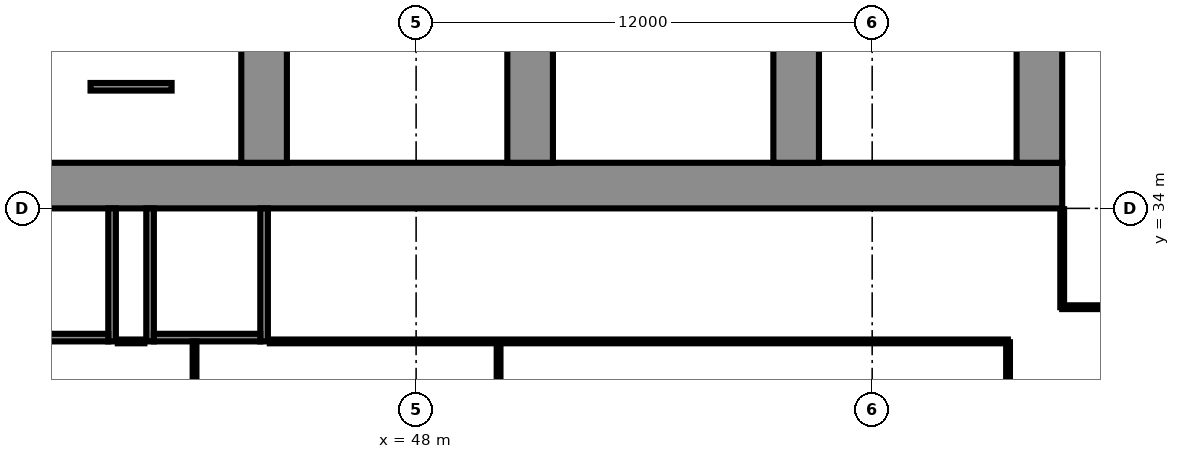
"""IFC4 building model, lengths in metres.
Left out: names, types, materials, properties, quantities, classifications, styles, units other than length and angle.
Written with IfcOpenShell. Run it as: python <this file> out.ifc"""

import sys

from ifc_helpers import new_model, si_unit, direction, frame, frame_2d, origin, place, context, subcontext, project, spatial, polyline, rectangle, outline, extrude, element, fill, save


model = new_model("IFC4")
c1 = context("Model", 3, precision=1e-05, world=origin(), true_north=direction((0.0, 1.0)))
c2 = subcontext(c1, "Body", "Model", "MODEL_VIEW")
j1 = project(units=[si_unit("LENGTHUNIT", "METRE"), si_unit("PLANEANGLEUNIT", "RADIAN")], contexts=[c1])
p1 = place(None, origin())
s1 = spatial("IfcSite", under=j1, at=p1, CompositionType="ELEMENT")
p2 = place(p1, origin())
s2 = spatial("IfcBuilding", under=s1, at=p2, CompositionType="ELEMENT")
p3 = place(p2, frame((0.0, 0.0, 41.5)))
s3 = spatial("IfcBuildingStorey", under=s2, at=p3, CompositionType="ELEMENT", Elevation=41.5)
p4 = place(p3, frame((9.0, 34.6, 0.0), z_axis=(0.0, 0.0, 1.0), x_axis=(1.0, 0.0, 0.0)))
e1 = element("IfcWall", 1, at=p4, inside=s3, PredefinedType="SHEAR", context=c2, shape_type="SweptSolid", body=[
    extrude(rectangle(XDim=56.0, YDim=1.2, at=frame_2d((28.0, 0.0))), origin(), (0.0, 0.0, 1.0), 3.6),
])
p5 = place(p4, frame((3.3, 0.0, 0.0)))
e2 = element("IfcOpeningElement", 2, at=p5, cuts=e1, PredefinedType="OPENING", context=c2, shape_type="SweptSolid", body=[
    extrude(rectangle(XDim=1.0, YDim=2.1, at=frame_2d((0.5, 1.05))), frame((0.0, 0.61, 0.0), z_axis=(0.0, -1.0, 0.0), x_axis=(1.0, 0.0, 0.0)), (0.0, 0.0, 1.0), 1.22),
])
p6 = place(p4, frame((7.867, 0.0, 0.0)))
e3 = element("IfcOpeningElement", 3, at=p6, cuts=e1, PredefinedType="OPENING", context=c2, shape_type="SweptSolid", body=[
    extrude(rectangle(XDim=1.1, YDim=2.1, at=frame_2d((0.55, 1.05))), frame((0.0, 0.61, 0.0), z_axis=(0.0, -1.0, 0.0), x_axis=(1.0, 0.0, 0.0)), (0.0, 0.0, 1.0), 1.22),
])
p7 = place(p4, frame((12.033, 0.0, 0.0)))
e4 = element("IfcOpeningElement", 4, at=p7, cuts=e1, PredefinedType="OPENING", context=c2, shape_type="SweptSolid", body=[
    extrude(rectangle(XDim=1.1, YDim=2.1, at=frame_2d((0.55, 1.05))), frame((0.0, 0.61, 0.0), z_axis=(0.0, -1.0, 0.0), x_axis=(1.0, 0.0, 0.0)), (0.0, 0.0, 1.0), 1.22),
])
p8 = place(p4, frame((9.8, 0.0, 0.0)))
e5 = element("IfcOpeningElement", 5, at=p8, cuts=e1, PredefinedType="OPENING", context=c2, shape_type="SweptSolid", body=[
    extrude(rectangle(XDim=1.4, YDim=2.1, at=frame_2d((0.7, 1.05))), frame((0.0, 0.61, 0.0), z_axis=(0.0, -1.0, 0.0), x_axis=(1.0, 0.0, 0.0)), (0.0, 0.0, 1.0), 1.22),
])
p9 = place(p4, frame((14.65, 0.0, 0.0)))
e6 = element("IfcOpeningElement", 6, at=p9, cuts=e1, PredefinedType="OPENING", context=c2, shape_type="SweptSolid", body=[
    extrude(rectangle(XDim=1.2, YDim=2.1, at=frame_2d((0.6, 1.05))), frame((0.0, 0.61, 0.0), z_axis=(0.0, -1.0, 0.0), x_axis=(1.0, 0.0, 0.0)), (0.0, 0.0, 1.0), 1.22),
])
p10 = place(p4, frame((21.867, 0.0, 0.0)))
e7 = element("IfcOpeningElement", 7, at=p10, cuts=e1, PredefinedType="OPENING", context=c2, shape_type="SweptSolid", body=[
    extrude(rectangle(XDim=1.1, YDim=2.1, at=frame_2d((0.55, 1.05))), frame((0.0, 0.61, 0.0), z_axis=(0.0, -1.0, 0.0), x_axis=(1.0, 0.0, 0.0)), (0.0, 0.0, 1.0), 1.22),
])
p11 = place(p4, frame((26.033, 0.0, 0.0)))
e8 = element("IfcOpeningElement", 8, at=p11, cuts=e1, PredefinedType="OPENING", context=c2, shape_type="SweptSolid", body=[
    extrude(rectangle(XDim=1.1, YDim=2.1, at=frame_2d((0.55, 1.05))), frame((0.0, 0.61, 0.0), z_axis=(0.0, -1.0, 0.0), x_axis=(1.0, 0.0, 0.0)), (0.0, 0.0, 1.0), 1.22),
])
p12 = place(p4, frame((23.8, 0.0, 0.0)))
e9 = element("IfcOpeningElement", 9, at=p12, cuts=e1, PredefinedType="OPENING", context=c2, shape_type="SweptSolid", body=[
    extrude(rectangle(XDim=1.4, YDim=2.1, at=frame_2d((0.7, 1.05))), frame((0.0, 0.61, 0.0), z_axis=(0.0, -1.0, 0.0), x_axis=(1.0, 0.0, 0.0)), (0.0, 0.0, 1.0), 1.22),
])
p13 = place(p4, frame((28.867, 0.0, 0.0)))
e10 = element("IfcOpeningElement", 10, at=p13, cuts=e1, PredefinedType="OPENING", context=c2, shape_type="SweptSolid", body=[
    extrude(rectangle(XDim=1.1, YDim=2.1, at=frame_2d((0.55, 1.05))), frame((0.0, 0.61, 0.0), z_axis=(0.0, -1.0, 0.0), x_axis=(1.0, 0.0, 0.0)), (0.0, 0.0, 1.0), 1.22),
])
p14 = place(p4, frame((33.033, 0.0, 0.0)))
e11 = element("IfcOpeningElement", 11, at=p14, cuts=e1, PredefinedType="OPENING", context=c2, shape_type="SweptSolid", body=[
    extrude(rectangle(XDim=1.1, YDim=2.1, at=frame_2d((0.55, 1.05))), frame((0.0, 0.61, 0.0), z_axis=(0.0, -1.0, 0.0), x_axis=(1.0, 0.0, 0.0)), (0.0, 0.0, 1.0), 1.22),
])
p15 = place(p4, frame((40.15, 0.0, 0.0)))
e12 = element("IfcOpeningElement", 12, at=p15, cuts=e1, PredefinedType="OPENING", context=c2, shape_type="SweptSolid", body=[
    extrude(rectangle(XDim=1.2, YDim=2.1, at=frame_2d((0.6, 1.05))), frame((0.0, 0.61, 0.0), z_axis=(0.0, -1.0, 0.0), x_axis=(1.0, 0.0, 0.0)), (0.0, 0.0, 1.0), 1.22),
])
p16 = place(p4, frame((44.8, 0.0, 0.0)))
e13 = element("IfcOpeningElement", 13, at=p16, cuts=e1, PredefinedType="OPENING", context=c2, shape_type="SweptSolid", body=[
    extrude(rectangle(XDim=1.4, YDim=2.1, at=frame_2d((0.7, 1.05))), frame((0.0, 0.61, 0.0), z_axis=(0.0, -1.0, 0.0), x_axis=(1.0, 0.0, 0.0)), (0.0, 0.0, 1.0), 1.22),
])
p17 = place(p4, frame((49.867, 0.0, 0.0)))
e14 = element("IfcOpeningElement", 14, at=p17, cuts=e1, PredefinedType="OPENING", context=c2, shape_type="SweptSolid", body=[
    extrude(rectangle(XDim=1.1, YDim=2.1, at=frame_2d((0.55, 1.05))), frame((0.0, 0.61, 0.0), z_axis=(0.0, -1.0, 0.0), x_axis=(1.0, 0.0, 0.0)), (0.0, 0.0, 1.0), 1.22),
])
p18 = place(p4, frame((53.5, 0.0, 0.0)))
e15 = element("IfcOpeningElement", 15, at=p18, cuts=e1, PredefinedType="OPENING", context=c2, shape_type="SweptSolid", body=[
    extrude(rectangle(XDim=1.1, YDim=2.1, at=frame_2d((0.55, 1.05))), frame((0.0, 0.61, 0.0), z_axis=(0.0, -1.0, 0.0), x_axis=(1.0, 0.0, 0.0)), (0.0, 0.0, 1.0), 1.22),
])
p19 = place(p4, frame((51.567, 0.0, 0.0)))
e16 = element("IfcOpeningElement", 16, at=p19, cuts=e1, PredefinedType="OPENING", context=c2, shape_type="SweptSolid", body=[
    extrude(rectangle(XDim=1.4, YDim=2.1, at=frame_2d((0.7, 1.05))), frame((0.0, 0.61, 0.0), z_axis=(0.0, -1.0, 0.0), x_axis=(1.0, 0.0, 0.0)), (0.0, 0.0, 1.0), 1.22),
])
p20 = place(p3, frame((44.0, 35.2, 0.0), z_axis=(0.0, 0.0, 1.0), x_axis=(0.0, 1.0, 0.0)))
e17 = element("IfcWall", 17, at=p20, inside=s3, PredefinedType="SHEAR", context=c2, shape_type="SweptSolid", body=[
    extrude(rectangle(XDim=14.168, YDim=1.2, at=frame_2d((7.084, 0.0))), origin(), (0.0, 0.0, 1.0), 3.6),
])
p21 = place(p20, frame((3.2, 0.0, 0.0)))
e18 = element("IfcOpeningElement", 18, at=p21, cuts=e17, PredefinedType="OPENING", context=c2, shape_type="SweptSolid", body=[
    extrude(rectangle(XDim=1.1, YDim=2.1, at=frame_2d((0.55, 1.05))), frame((0.0, 0.61, 0.0), z_axis=(0.0, -1.0, 0.0), x_axis=(1.0, 0.0, 0.0)), (0.0, 0.0, 1.0), 1.22),
])
p22 = place(p20, frame((9.6, 0.0, 0.0)))
e19 = element("IfcOpeningElement", 19, at=p22, cuts=e17, PredefinedType="OPENING", context=c2, shape_type="SweptSolid", body=[
    extrude(rectangle(XDim=1.0, YDim=2.1, at=frame_2d((0.5, 1.05))), frame((0.0, 0.61, 0.0), z_axis=(0.0, -1.0, 0.0), x_axis=(1.0, 0.0, 0.0)), (0.0, 0.0, 1.0), 1.22),
])
p23 = place(p3, frame((51.0, 35.2, 0.0), z_axis=(0.0, 0.0, 1.0), x_axis=(0.0, 1.0, 0.0)))
e20 = element("IfcWall", 20, at=p23, inside=s3, PredefinedType="SHEAR", context=c2, shape_type="SweptSolid", body=[
    extrude(rectangle(XDim=13.555, YDim=1.2, at=frame_2d((6.778, 0.0))), origin(), (0.0, 0.0, 1.0), 3.6),
])
p24 = place(p23, frame((3.2, 0.0, 0.0)))
e21 = element("IfcOpeningElement", 21, at=p24, cuts=e20, PredefinedType="OPENING", context=c2, shape_type="SweptSolid", body=[
    extrude(rectangle(XDim=1.1, YDim=2.1, at=frame_2d((0.55, 1.05))), frame((0.0, 0.61, 0.0), z_axis=(0.0, -1.0, 0.0), x_axis=(1.0, 0.0, 0.0)), (0.0, 0.0, 1.0), 1.22),
])
p25 = place(p3, frame((58.0, 35.2, 0.0), z_axis=(0.0, 0.0, 1.0), x_axis=(0.0, 1.0, 0.0)))
e22 = element("IfcWall", 22, at=p25, inside=s3, PredefinedType="SHEAR", context=c2, shape_type="SweptSolid", body=[
    extrude(rectangle(XDim=12.943, YDim=1.2, at=frame_2d((6.471, 0.0))), origin(), (0.0, 0.0, 1.0), 3.6),
])
p26 = place(p25, frame((10.134, 0.0, 0.0)))
e23 = element("IfcOpeningElement", 23, at=p26, cuts=e22, PredefinedType="OPENING", context=c2, shape_type="SweptSolid", body=[
    extrude(rectangle(XDim=1.0, YDim=2.1, at=frame_2d((0.5, 1.05))), frame((0.0, 0.61, 0.0), z_axis=(0.0, -1.0, 0.0), x_axis=(1.0, 0.0, 0.0)), (0.0, 0.0, 1.0), 1.22),
])
p27 = place(p25, frame((3.2, 0.0, 0.0)))
e24 = element("IfcOpeningElement", 24, at=p27, cuts=e22, PredefinedType="OPENING", context=c2, shape_type="SweptSolid", body=[
    extrude(rectangle(XDim=1.1, YDim=2.1, at=frame_2d((0.55, 1.05))), frame((0.0, 0.61, 0.0), z_axis=(0.0, -1.0, 0.0), x_axis=(1.0, 0.0, 0.0)), (0.0, 0.0, 1.0), 1.22),
])
p28 = place(p3, frame((64.4, 35.2, 0.0), z_axis=(0.0, 0.0, 1.0), x_axis=(0.0, 1.0, 0.0)))
e25 = element("IfcWall", 25, at=p28, inside=s3, PredefinedType="SHEAR", context=c2, shape_type="SweptSolid", body=[
    extrude(rectangle(XDim=12.383, YDim=1.2, at=frame_2d((6.191, 0.0))), origin(), (0.0, 0.0, 1.0), 3.6),
])
p29 = place(p3, frame((39.433, 37.2, 0.0), z_axis=(0.0, 0.0, 1.0), x_axis=(1.0, 0.0, 0.0)))
e26 = element("IfcWall", 26, at=p29, inside=s3, PredefinedType="PARTITIONING", context=c2, shape_type="SweptSolid", body=[
    extrude(rectangle(XDim=2.133, YDim=0.2, at=frame_2d((1.067, 0.0))), origin(), (0.0, 0.0, 1.0), 3.2),
])
p30 = place(p29, frame((0.567, 0.0, 0.0)))
e27 = element("IfcOpeningElement", 27, at=p30, cuts=e26, PredefinedType="OPENING", context=c2, shape_type="SweptSolid", body=[
    extrude(rectangle(XDim=1.0, YDim=2.1, at=frame_2d((0.5, 1.05))), frame((0.0, 0.11, 0.0), z_axis=(0.0, -1.0, 0.0), x_axis=(1.0, 0.0, 0.0)), (0.0, 0.0, 1.0), 0.22),
])
p31 = place(p3, frame((0.0, 0.0, -0.0)))
e28 = element("IfcWall", 28, at=p31, inside=s3, PredefinedType="PARTITIONING", context=c2, shape_type="SweptSolid", body=[
    extrude(outline(polyline([(41.567, 37.95), (41.767, 37.95), (43.4, 37.95), (43.4, 37.75), (41.767, 37.75), (41.767, 35.2), (41.567, 35.2), (41.567, 37.95)])), origin(), (0.0, 0.0, 1.0), 3.2),
])
p32 = place(p3, frame((0.0, 0.0, -0.0)))
e29 = element("IfcWall", 29, at=p32, inside=s3, PredefinedType="PARTITIONING", context=c2, shape_type="SweptSolid", body=[
    extrude(outline(polyline([(39.233, 38.05), (37.6, 38.05), (37.6, 38.25), (39.233, 38.25), (39.433, 38.25), (39.433, 35.2), (39.233, 35.2), (39.233, 38.05)])), origin(), (0.0, 0.0, 1.0), 3.2),
])
p33 = place(p3, frame((0.0, 0.0, -0.0)))
e30 = element("IfcWall", 30, at=p33, inside=s3, PredefinedType="PARTITIONING", context=c2, shape_type="SweptSolid", body=[
    extrude(outline(polyline([(53.233, 37.15), (51.6, 37.15), (51.6, 37.35), (53.233, 37.35), (53.433, 37.35), (53.433, 35.2), (53.233, 35.2), (53.233, 37.15)])), origin(), (0.0, 0.0, 1.0), 3.2),
])
p34 = place(p3, frame((0.0, 0.0, -0.0)))
e31 = element("IfcWall", 31, at=p34, inside=s3, PredefinedType="PARTITIONING", context=c2, shape_type="SweptSolid", body=[
    extrude(outline(polyline([(55.567, 37.35), (55.767, 37.35), (57.4, 37.35), (57.4, 37.15), (55.767, 37.15), (55.767, 35.2), (55.567, 35.2), (55.567, 37.35)])), origin(), (0.0, 0.0, 1.0), 3.2),
])
p35 = place(p3, frame((0.0, 0.0, -0.0)))
e32 = element("IfcWall", 32, at=p35, inside=s3, PredefinedType="PARTITIONING", context=c2, shape_type="SweptSolid", body=[
    extrude(outline(polyline([(60.233, 37.15), (58.6, 37.15), (58.6, 37.35), (60.233, 37.35), (60.433, 37.35), (60.433, 35.2), (60.233, 35.2), (60.233, 37.15)])), origin(), (0.0, 0.0, 1.0), 3.2),
])
p36 = place(p3, frame((0.0, 0.0, -0.0)))
e33 = element("IfcWall", 33, at=p36, inside=s3, PredefinedType="PARTITIONING", context=c2, shape_type="SweptSolid", body=[
    extrude(outline(polyline([(62.1, 37.35), (62.3, 37.35), (63.8, 37.35), (63.8, 37.15), (62.3, 37.15), (62.3, 35.2), (62.1, 35.2), (62.1, 37.35)])), origin(), (0.0, 0.0, 1.0), 3.2),
])
p37 = place(p3, frame((40.0, 30.5, 0.0), z_axis=(0.0, 0.0, 1.0), x_axis=(0.0, 1.0, 0.0)))
e34 = element("IfcWall", 34, at=p37, inside=s3, PredefinedType="PARTITIONING", context=c2, shape_type="SweptSolid", body=[
    extrude(rectangle(XDim=3.5, YDim=0.2, at=frame_2d((1.75, 0.0))), origin(), (0.0, 0.0, 1.0), 3.2),
])
p38 = place(p3, frame((37.1, 30.6, 0.0), z_axis=(0.0, 0.0, 1.0), x_axis=(1.0, 0.0, 0.0)))
e35 = element("IfcWall", 35, at=p38, inside=s3, PredefinedType="PARTITIONING", context=c2, shape_type="SweptSolid", body=[
    extrude(rectangle(XDim=2.8, YDim=0.2, at=frame_2d((1.4, 0.0))), origin(), (0.0, 0.0, 1.0), 3.2),
])
p39 = place(p3, frame((41.0, 30.5, 0.0), z_axis=(0.0, 0.0, 1.0), x_axis=(0.0, 1.0, 0.0)))
e36 = element("IfcWall", 36, at=p39, inside=s3, PredefinedType="PARTITIONING", context=c2, shape_type="SweptSolid", body=[
    extrude(rectangle(XDim=3.5, YDim=0.2, at=frame_2d((1.75, 0.0))), origin(), (0.0, 0.0, 1.0), 3.2),
])
p40 = place(p3, frame((44.0, 30.5, 0.0), z_axis=(0.0, 0.0, 1.0), x_axis=(0.0, 1.0, 0.0)))
e37 = element("IfcWall", 37, at=p40, inside=s3, PredefinedType="PARTITIONING", context=c2, shape_type="SweptSolid", body=[
    extrude(rectangle(XDim=3.5, YDim=0.2, at=frame_2d((1.75, 0.0))), origin(), (0.0, 0.0, 1.0), 3.2),
])
p41 = place(p40, frame((1.2, 0.0, 0.0)))
e38 = element("IfcOpeningElement", 38, at=p41, cuts=e37, PredefinedType="OPENING", context=c2, shape_type="SweptSolid", body=[
    extrude(rectangle(XDim=1.1, YDim=2.1, at=frame_2d((0.55, 1.05))), frame((0.0, 0.11, 0.0), z_axis=(0.0, -1.0, 0.0), x_axis=(1.0, 0.0, 0.0)), (0.0, 0.0, 1.0), 0.22),
])
p42 = place(p3, frame((41.1, 30.6, 0.0), z_axis=(0.0, 0.0, 1.0), x_axis=(1.0, 0.0, 0.0)))
e39 = element("IfcWall", 39, at=p42, inside=s3, PredefinedType="PARTITIONING", context=c2, shape_type="SweptSolid", body=[
    extrude(rectangle(XDim=2.8, YDim=0.2, at=frame_2d((1.4, 0.0))), origin(), (0.0, 0.0, 1.0), 3.2),
])
for number, where, z_axis, x_axis in (
    (40, (42.17, 14.24, 0.0), (0.0, 0.0, 1.0), (0.0, 1.0, 0.0)),
    (41, (50.17, 14.24, 0.0), (0.0, 0.0, 1.0), (0.0, 1.0, 0.0)),
    (42, (57.67, 14.24, 0.0), (0.0, 0.0, 1.0), (0.0, 1.0, 0.0)),
):
    element("IfcWall", number, at=place(p3, frame(where, z_axis=z_axis, x_axis=x_axis)), inside=s3, PredefinedType="PARTITIONING", context=c2, shape_type="SweptSolid", body=[
        extrude(rectangle(XDim=16.26, YDim=0.1, at=frame_2d((8.13, 0.0))), origin(), (0.0, 0.0, 1.0), 3.2),
    ])
p43 = place(p3, frame((63.57, 14.245, 0.0), z_axis=(0.0, 0.0, 1.0), x_axis=(0.000331, 1.000002, 0.0)))
e43 = element("IfcWall", 43, at=p43, inside=s3, PredefinedType="PARTITIONING", context=c2, shape_type="SweptSolid", body=[
    extrude(rectangle(XDim=16.233, YDim=0.1, at=frame_2d((8.117, 0.0))), origin(), (0.0, 0.0, 1.0), 3.2),
])
p44 = place(p3, frame((65.0, 31.4, 0.0), z_axis=(0.0, 0.0, 1.0), x_axis=(0.0, 1.0, 0.0)))
e44 = element("IfcWall", 44, at=p44, inside=s3, PredefinedType="PARTITIONING", context=c2, shape_type="SweptSolid", body=[
    extrude(rectangle(XDim=2.58, YDim=0.1, at=frame_2d((1.29, 0.0))), origin(), (0.0, 0.0, 1.0), 3.2),
])
p45 = place(p3, frame((65.0, 31.4, 0.0), z_axis=(0.0, 0.0, 1.0), x_axis=(1.0, 0.0, 0.0)))
e45 = element("IfcWall", 45, at=p45, inside=s3, PredefinedType="PARTITIONING", context=c2, shape_type="SweptSolid", body=[
    extrude(rectangle(XDim=7.125, YDim=0.1, at=frame_2d((3.562, 0.0))), origin(), (0.0, 0.0, 1.0), 3.2),
])
p46 = place(p45, frame((0.1, 0.0, 0.0)))
e46 = element("IfcOpeningElement", 46, at=p46, cuts=e45, PredefinedType="OPENING", context=c2, shape_type="SweptSolid", body=[
    extrude(rectangle(XDim=1.0, YDim=2.1, at=frame_2d((0.5, 1.05))), frame((0.0, 0.06, 0.0), z_axis=(0.0, -1.0, 0.0), x_axis=(1.0, 0.0, 0.0)), (0.0, 0.0, 1.0), 0.12),
])
p47 = place(p45, frame((5.625, 0.0, 0.0)))
e47 = element("IfcOpeningElement", 47, at=p47, cuts=e45, PredefinedType="OPENING", context=c2, shape_type="SweptSolid", body=[
    extrude(rectangle(XDim=1.0, YDim=2.1, at=frame_2d((0.5, 1.05))), frame((0.0, 0.06, 0.0), z_axis=(0.0, -1.0, 0.0), x_axis=(1.0, 0.0, 0.0)), (0.0, 0.0, 1.0), 0.12),
])
p48 = place(p3, frame((40.15, 30.5, 0.0), z_axis=(0.0, 0.0, 1.0), x_axis=(1.0, 0.0, 0.0)))
e48 = element("IfcWall", 48, at=p48, inside=s3, PredefinedType="PARTITIONING", context=c2, shape_type="SweptSolid", body=[
    extrude(rectangle(XDim=0.7, YDim=0.1, at=frame_2d((0.35, 0.0))), origin(), (0.0, 0.0, 1.0), 3.2),
])
p49 = place(p3, frame((44.15, 30.5, 0.0), z_axis=(0.0, 0.0, 1.0), x_axis=(1.0, 0.0, 0.0)))
e49 = element("IfcWall", 49, at=p49, inside=s3, PredefinedType="PARTITIONING", context=c2, shape_type="SweptSolid", body=[
    extrude(rectangle(XDim=19.42, YDim=0.1, at=frame_2d((9.71, 0.0))), origin(), (0.0, 0.0, 1.0), 3.2),
])
p50 = place(p49, frame((15.54, 0.0, 0.0)))
e50 = element("IfcOpeningElement", 50, at=p50, cuts=e49, PredefinedType="OPENING", context=c2, shape_type="SweptSolid", body=[
    extrude(rectangle(XDim=1.0, YDim=2.1, at=frame_2d((0.5, 1.05))), frame((0.0, 0.06, 0.0), z_axis=(0.0, -1.0, 0.0), x_axis=(1.0, 0.0, 0.0)), (0.0, 0.0, 1.0), 0.12),
])
p51 = place(p30, origin())
e51 = element("IfcDoor", 51, at=p51, inside=s3, OperationType="SINGLE_SWING_RIGHT", PredefinedType="DOOR", context=c2, shape_type="SweptSolid", body=[
    extrude(rectangle(XDim=1.0, YDim=2.1, at=frame_2d((0.5, 1.05))), frame((0.0, 0.025, 0.0), z_axis=(0.0, -1.0, 0.0), x_axis=(1.0, 0.0, 0.0)), (0.0, 0.0, 1.0), 0.05),
])
fill(e27, e51)
p52 = place(p13, origin())
e52 = element("IfcDoor", 52, at=p52, inside=s3, OperationType="DOUBLE_DOOR_SLIDING", PredefinedType="DOOR", context=c2, shape_type="SweptSolid", body=[
    extrude(rectangle(XDim=1.1, YDim=2.1, at=frame_2d((0.55, 1.05))), frame((0.0, 0.025, 0.0), z_axis=(0.0, -1.0, 0.0), x_axis=(1.0, 0.0, 0.0)), (0.0, 0.0, 1.0), 0.05),
])
fill(e10, e52)
p53 = place(p14, origin())
e53 = element("IfcDoor", 53, at=p53, inside=s3, OperationType="DOUBLE_DOOR_SLIDING", PredefinedType="DOOR", context=c2, shape_type="SweptSolid", body=[
    extrude(rectangle(XDim=1.1, YDim=2.1, at=frame_2d((0.55, 1.05))), frame((0.0, 0.025, 0.0), z_axis=(0.0, -1.0, 0.0), x_axis=(1.0, 0.0, 0.0)), (0.0, 0.0, 1.0), 0.05),
])
fill(e11, e53)
p54 = place(p15, origin())
e54 = element("IfcDoor", 54, at=p54, inside=s3, OperationType="SINGLE_SWING_LEFT", PredefinedType="DOOR", context=c2, shape_type="SweptSolid", body=[
    extrude(rectangle(XDim=1.2, YDim=2.1, at=frame_2d((0.6, 1.05))), frame((0.0, 0.025, 0.0), z_axis=(0.0, -1.0, 0.0), x_axis=(1.0, 0.0, 0.0)), (0.0, 0.0, 1.0), 0.05),
])
fill(e12, e54)
p55 = place(p16, origin())
e55 = element("IfcDoor", 55, at=p55, inside=s3, OperationType="DOUBLE_DOOR_SINGLE_SWING", PredefinedType="DOOR", context=c2, shape_type="SweptSolid", body=[
    extrude(rectangle(XDim=1.4, YDim=2.1, at=frame_2d((0.7, 1.05))), frame((0.0, 0.025, 0.0), z_axis=(0.0, -1.0, 0.0), x_axis=(1.0, 0.0, 0.0)), (0.0, 0.0, 1.0), 0.05),
])
fill(e13, e55)
p56 = place(p17, origin())
e56 = element("IfcDoor", 56, at=p56, inside=s3, OperationType="DOUBLE_DOOR_SLIDING", PredefinedType="DOOR", context=c2, shape_type="SweptSolid", body=[
    extrude(rectangle(XDim=1.1, YDim=2.1, at=frame_2d((0.55, 1.05))), frame((0.0, 0.025, 0.0), z_axis=(0.0, -1.0, 0.0), x_axis=(1.0, 0.0, 0.0)), (0.0, 0.0, 1.0), 0.05),
])
fill(e14, e56)
p57 = place(p18, origin())
e57 = element("IfcDoor", 57, at=p57, inside=s3, OperationType="DOUBLE_DOOR_SLIDING", PredefinedType="DOOR", context=c2, shape_type="SweptSolid", body=[
    extrude(rectangle(XDim=1.1, YDim=2.1, at=frame_2d((0.55, 1.05))), frame((0.0, 0.025, 0.0), z_axis=(0.0, -1.0, 0.0), x_axis=(1.0, 0.0, 0.0)), (0.0, 0.0, 1.0), 0.05),
])
fill(e15, e57)
p58 = place(p19, origin())
e58 = element("IfcDoor", 58, at=p58, inside=s3, OperationType="DOUBLE_DOOR_SINGLE_SWING", PredefinedType="DOOR", context=c2, shape_type="SweptSolid", body=[
    extrude(rectangle(XDim=1.4, YDim=2.1, at=frame_2d((0.7, 1.05))), frame((0.0, 0.025, 0.0), z_axis=(0.0, -1.0, 0.0), x_axis=(1.0, 0.0, 0.0)), (0.0, 0.0, 1.0), 0.05),
])
fill(e16, e58)
p59 = place(p41, origin())
e59 = element("IfcDoor", 59, at=p59, inside=s3, OperationType="SINGLE_SWING_LEFT", PredefinedType="DOOR", context=c2, shape_type="SweptSolid", body=[
    extrude(rectangle(XDim=1.1, YDim=2.1, at=frame_2d((0.55, 1.05))), frame((0.0, 0.025, 0.0), z_axis=(0.0, -1.0, 0.0), x_axis=(1.0, 0.0, 0.0)), (0.0, 0.0, 1.0), 0.05),
])
fill(e38, e59)
p60 = place(p50, origin())
e60 = element("IfcDoor", 60, at=p60, inside=s3, OperationType="SINGLE_SWING_RIGHT", PredefinedType="DOOR", context=c2, shape_type="SweptSolid", body=[
    extrude(rectangle(XDim=1.0, YDim=2.1, at=frame_2d((0.5, 1.05))), frame((0.0, 0.025, 0.0), z_axis=(0.0, -1.0, 0.0), x_axis=(1.0, 0.0, 0.0)), (0.0, 0.0, 1.0), 0.05),
])
fill(e50, e60)
p61 = place(p46, origin())
e61 = element("IfcDoor", 61, at=p61, inside=s3, OperationType="SINGLE_SWING_LEFT", PredefinedType="DOOR", context=c2, shape_type="SweptSolid", body=[
    extrude(rectangle(XDim=1.0, YDim=2.1, at=frame_2d((0.5, 1.05))), frame((0.0, 0.025, 0.0), z_axis=(0.0, -1.0, 0.0), x_axis=(1.0, 0.0, 0.0)), (0.0, 0.0, 1.0), 0.05),
])
fill(e46, e61)
save(model, sys.argv[1])
